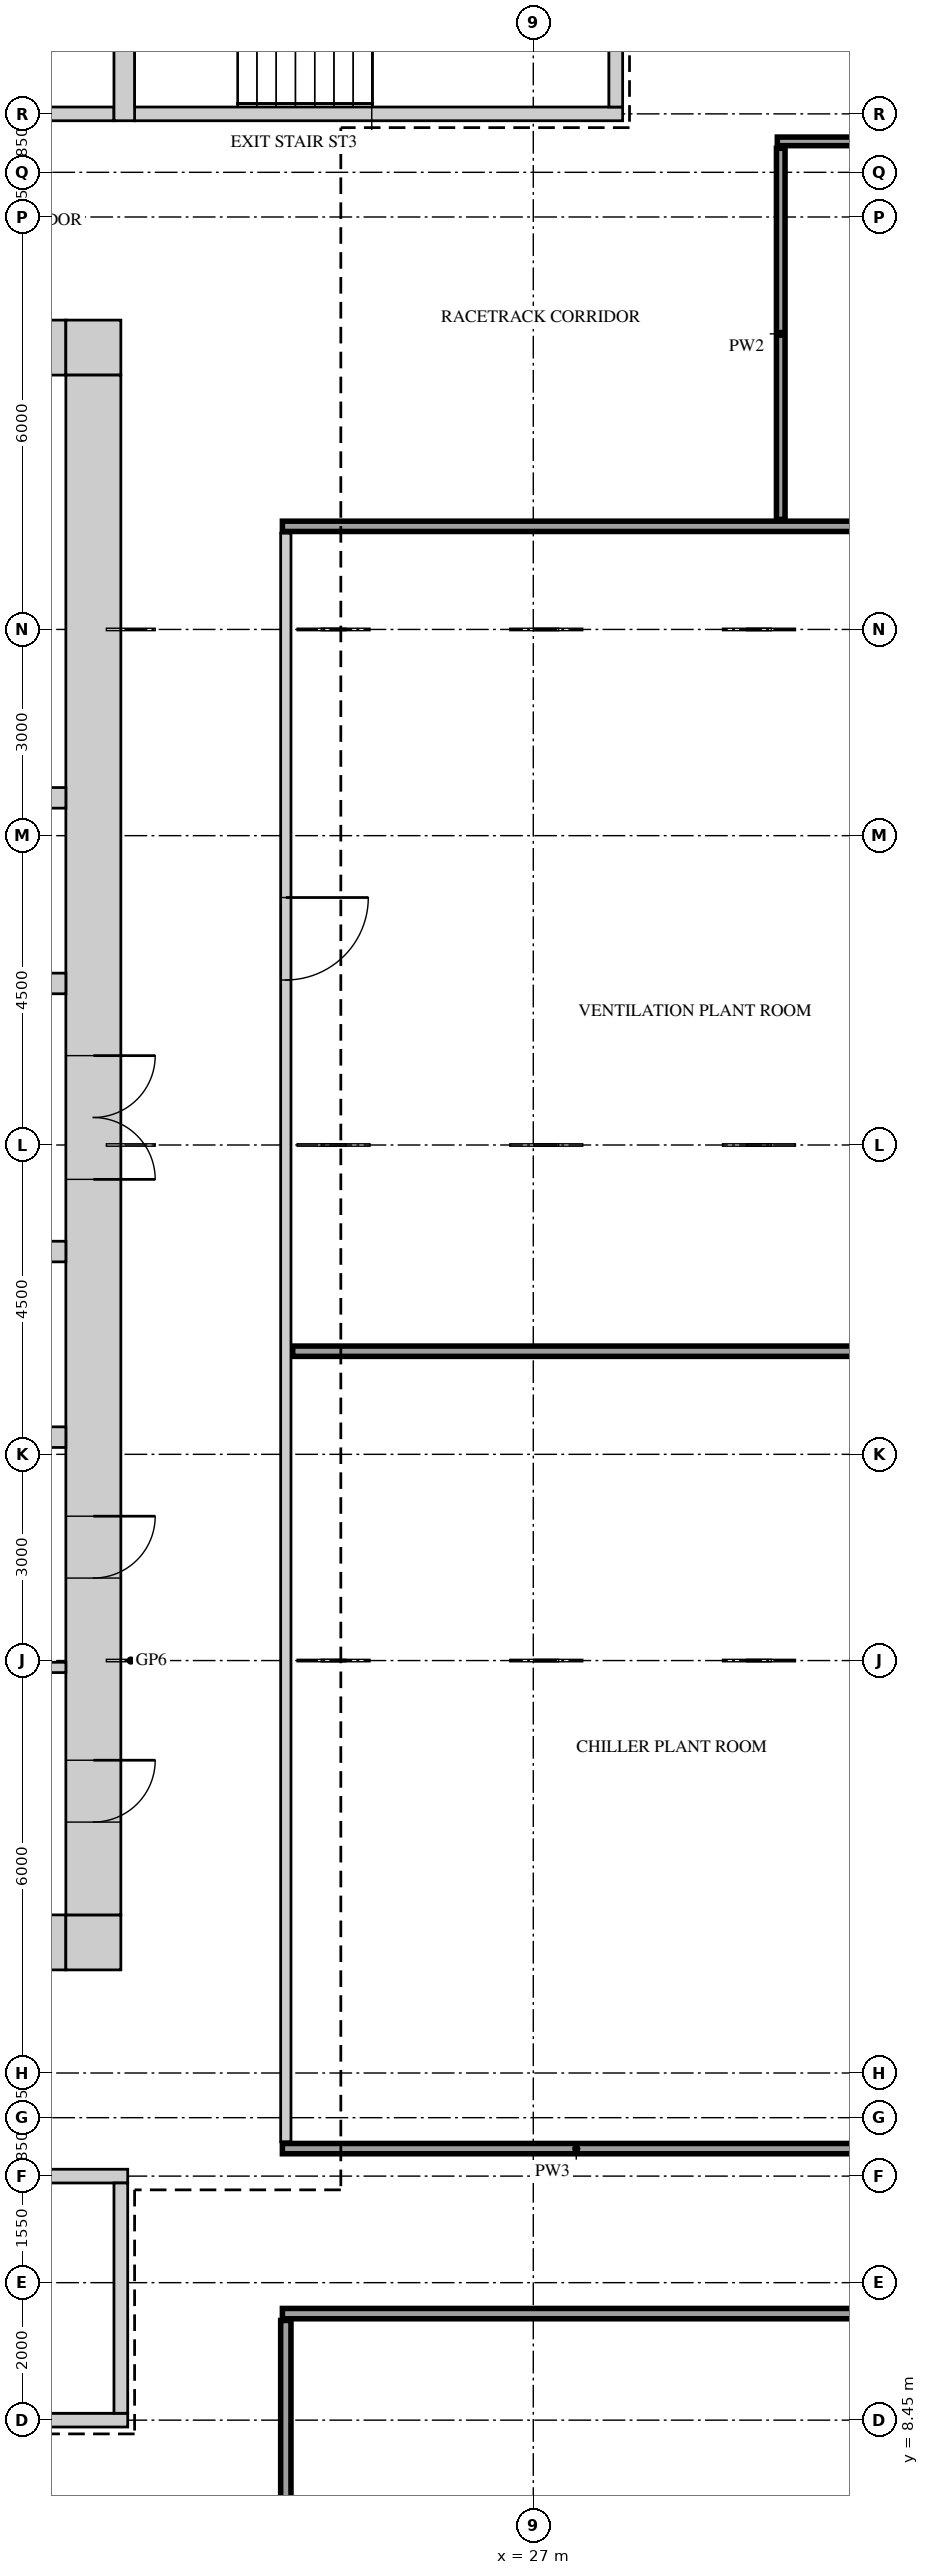
"""IFC4 building model, lengths in metres.
Left out: names, types, materials, properties, quantities, classifications, styles, units other than length and angle.
Written with IfcOpenShell. Run it as: python <this file> out.ifc"""

import sys

from ifc_helpers import new_model, si_unit, direction, frame, frame_2d, origin, place, context, subcontext, project, spatial, rectangle, extrude, source, transform, mapped, element, fill, save


model = new_model("IFC4")
c1 = context("Model", 3, precision=1e-05, world=origin(), true_north=direction((0.0, 1.0)))
c2 = subcontext(c1, "Body", "Model", "MODEL_VIEW")
j1 = project(units=[si_unit("LENGTHUNIT", "METRE"), si_unit("PLANEANGLEUNIT", "RADIAN")], contexts=[c1])
p1 = place(None, origin())
s1 = spatial("IfcSite", under=j1, at=p1, CompositionType="ELEMENT")
p2 = place(p1, origin())
s2 = spatial("IfcBuilding", under=s1, at=p2, CompositionType="ELEMENT")
p3 = place(p2, frame((0.0, 0.0, 216.7)))
s3 = spatial("IfcBuildingStorey", under=s2, at=p3, CompositionType="ELEMENT", Elevation=216.7)
m1 = source(origin(), c2, "Body", "SweptSolid", [
    extrude(rectangle(XDim=13.4, YDim=0.8, at=frame_2d((6.7, 0.0))), origin(), (0.0, 0.0, 1.0), 5.25),
])
p4 = place(p3, frame((6.8, 38.6, 0.0), z_axis=(0.0, 0.0, 1.0), x_axis=(1.0, 0.0, 0.0)))
e1 = element("IfcWall", 1, at=p4, inside=s3, PredefinedType="SHEAR", context=c2, shape_type="MappedRepresentation", body=[
    mapped(m1, transform((0.0, 0.0, 0.0))),
])
m2 = source(origin(), c2, "Body", "SweptSolid", [
    extrude(rectangle(XDim=0.9, YDim=2.1, at=frame_2d((0.45, 1.05))), frame((0.0, 0.41, 0.0), z_axis=(0.0, -1.0, 0.0), x_axis=(1.0, 0.0, 0.0)), (0.0, 0.0, 1.0), 0.82),
])
p5 = place(p4, frame((2.9, 0.0, 0.0)))
e2 = element("IfcOpeningElement", 2, at=p5, cuts=e1, PredefinedType="OPENING", context=c2, shape_type="MappedRepresentation", body=[
    mapped(m2, transform((0.0, 0.0, 0.0))),
])
p6 = place(p4, frame((9.6, 0.0, 0.0)))
e3 = element("IfcOpeningElement", 3, at=p6, cuts=e1, PredefinedType="OPENING", context=c2, shape_type="MappedRepresentation", body=[
    mapped(m2, transform((0.0, 0.0, 0.0))),
])
m3 = source(origin(), c2, "Body", "SweptSolid", [
    extrude(rectangle(XDim=0.8, YDim=0.8, at=frame_2d((0.4, 0.0))), origin(), (0.0, 0.0, 1.0), 5.25),
])
p7 = place(p3, frame((20.2, 38.6, 0.0), z_axis=(0.0, 0.0, 1.0), x_axis=(1.0, 0.0, 0.0)))
e4 = element("IfcWall", 4, at=p7, inside=s3, PredefinedType="SHEAR", context=c2, shape_type="MappedRepresentation", body=[
    mapped(m3, transform((0.0, 0.0, 0.0))),
])
p8 = place(p3, frame((6.8, 15.4, 0.0), z_axis=(0.0, 0.0, 1.0), x_axis=(1.0, 0.0, 0.0)))
e5 = element("IfcWall", 5, at=p8, inside=s3, PredefinedType="SHEAR", context=c2, shape_type="MappedRepresentation", body=[
    mapped(m1, transform((0.0, 0.0, 0.0))),
])
m4 = source(origin(), c2, "Body", "SweptSolid", [
    extrude(rectangle(XDim=1.2, YDim=2.1, at=frame_2d((0.6, 1.05))), frame((0.0, 0.41, 0.0), z_axis=(0.0, -1.0, 0.0), x_axis=(1.0, 0.0, 0.0)), (0.0, 0.0, 1.0), 0.82),
])
p9 = place(p8, frame((5.4, 0.0, 0.0)))
e6 = element("IfcOpeningElement", 6, at=p9, cuts=e5, PredefinedType="OPENING", context=c2, shape_type="MappedRepresentation", body=[
    mapped(m4, transform((0.0, 0.0, 0.0))),
])
p10 = place(p8, frame((2.05, 0.0, 0.0)))
e7 = element("IfcOpeningElement", 7, at=p10, cuts=e5, PredefinedType="OPENING", context=c2, shape_type="MappedRepresentation", body=[
    mapped(m4, transform((0.0, 0.0, 0.0))),
])
m5 = source(origin(), c2, "Body", "SweptSolid", [
    extrude(rectangle(XDim=1.0, YDim=2.1, at=frame_2d((0.5, 1.05))), frame((0.0, 0.41, 0.0), z_axis=(0.0, -1.0, 0.0), x_axis=(1.0, 0.0, 0.0)), (0.0, 0.0, 1.0), 0.82),
])
p11 = place(p8, frame((7.9, 0.0, 0.0)))
e8 = element("IfcOpeningElement", 8, at=p11, cuts=e5, PredefinedType="OPENING", context=c2, shape_type="MappedRepresentation", body=[
    mapped(m5, transform((0.0, 0.0, 0.0))),
])
p12 = place(p3, frame((20.2, 15.4, 0.0), z_axis=(0.0, 0.0, 1.0), x_axis=(1.0, 0.0, 0.0)))
e9 = element("IfcWall", 9, at=p12, inside=s3, PredefinedType="SHEAR", context=c2, shape_type="MappedRepresentation", body=[
    mapped(m3, transform((0.0, 0.0, 0.0))),
])
m6 = source(origin(), c2, "Body", "SweptSolid", [
    extrude(rectangle(XDim=22.4, YDim=0.8, at=frame_2d((11.2, 0.0))), origin(), (0.0, 0.0, 1.0), 5.25),
])
p13 = place(p3, frame((20.6, 15.8, 0.0), z_axis=(0.0, 0.0, 1.0), x_axis=(0.0, 1.0, 0.0)))
e10 = element("IfcWall", 10, at=p13, inside=s3, PredefinedType="SHEAR", context=c2, shape_type="MappedRepresentation", body=[
    mapped(m6, transform((0.0, 0.0, 0.0))),
])
m7 = source(origin(), c2, "Body", "SweptSolid", [
    extrude(rectangle(XDim=1.8, YDim=2.1, at=frame_2d((0.9, 1.05))), frame((0.0, 0.41, 0.0), z_axis=(0.0, -1.0, 0.0), x_axis=(1.0, 0.0, 0.0)), (0.0, 0.0, 1.0), 0.82),
])
p14 = place(p13, frame((10.7, 0.0, 0.0)))
e11 = element("IfcOpeningElement", 11, at=p14, cuts=e10, PredefinedType="OPENING", context=c2, shape_type="MappedRepresentation", body=[
    mapped(m7, transform((0.0, 0.0, 0.0))),
])
p15 = place(p13, frame((1.35, 0.0, 0.0)))
e12 = element("IfcOpeningElement", 12, at=p15, cuts=e10, PredefinedType="OPENING", context=c2, shape_type="MappedRepresentation", body=[
    mapped(m2, transform((0.0, 0.0, 0.0))),
])
p16 = place(p13, frame((4.9, 0.0, 0.0)))
e13 = element("IfcOpeningElement", 13, at=p16, cuts=e10, PredefinedType="OPENING", context=c2, shape_type="MappedRepresentation", body=[
    mapped(m2, transform((0.0, 0.0, 0.0))),
])
m8 = source(origin(), c2, "Body", "SweptSolid", [
    extrude(rectangle(XDim=7.0, YDim=0.2, at=frame_2d((3.5, 0.0))), origin(), (0.0, 0.0, 1.0), 5.25),
])
p17 = place(p3, frame((13.9, 42.0, 0.0), z_axis=(0.0, 0.0, 1.0), x_axis=(1.0, 0.0, 0.0)))
e14 = element("IfcWall", 14, at=p17, inside=s3, PredefinedType="SHEAR", context=c2, shape_type="MappedRepresentation", body=[
    mapped(m8, transform((0.0, 0.0, 0.0))),
])
m9 = source(origin(), c2, "Body", "SweptSolid", [
    extrude(rectangle(XDim=7.2, YDim=0.2, at=frame_2d((3.6, 0.0))), origin(), (0.0, 0.0, 1.0), 5.25),
])
p18 = place(p3, frame((13.9, 12.0, 0.0), z_axis=(0.0, 0.0, 1.0), x_axis=(1.0, 0.0, 0.0)))
e15 = element("IfcWall", 15, at=p18, inside=s3, PredefinedType="SHEAR", context=c2, shape_type="MappedRepresentation", body=[
    mapped(m9, transform((0.0, 0.0, 0.0))),
])
p19 = place(p3, frame((13.9, 8.45, 0.0), z_axis=(0.0, 0.0, 1.0), x_axis=(1.0, 0.0, 0.0)))
e16 = element("IfcWall", 16, at=p19, inside=s3, PredefinedType="SHEAR", context=c2, shape_type="MappedRepresentation", body=[
    mapped(m9, transform((0.0, 0.0, 0.0))),
])
m10 = source(origin(), c2, "Body", "SweptSolid", [
    extrude(rectangle(XDim=1.2, YDim=2.1, at=frame_2d((0.6, 1.05))), frame((0.0, 0.11, 0.0), z_axis=(0.0, -1.0, 0.0), x_axis=(1.0, 0.0, 0.0)), (0.0, 0.0, 1.0), 0.22),
])
p20 = place(p19, frame((0.35, 0.0, 0.0)))
e17 = element("IfcOpeningElement", 17, at=p20, cuts=e16, PredefinedType="OPENING", context=c2, shape_type="MappedRepresentation", body=[
    mapped(m10, transform((0.0, 0.0, 0.0))),
])
m11 = source(origin(), c2, "Body", "SweptSolid", [
    extrude(rectangle(XDim=7.1, YDim=0.2, at=frame_2d((3.55, 0.0))), origin(), (0.0, 0.0, 1.0), 5.25),
])
p21 = place(p3, frame((21.2, 42.0, 0.0), z_axis=(0.0, 0.0, 1.0), x_axis=(1.0, 0.0, 0.0)))
e18 = element("IfcWall", 18, at=p21, inside=s3, PredefinedType="SHEAR", context=c2, shape_type="MappedRepresentation", body=[
    mapped(m11, transform((0.0, 0.0, 0.0))),
])
m12 = source(origin(), c2, "Body", "SweptSolid", [
    extrude(rectangle(XDim=3.75, YDim=0.3, at=frame_2d((1.875, 0.0))), origin(), (0.0, 0.0, 1.0), 5.25),
])
p22 = place(p3, frame((21.05, 41.9, 0.0), z_axis=(0.0, 0.0, 1.0), x_axis=(0.0, 1.0, 0.0)))
e19 = element("IfcWall", 19, at=p22, inside=s3, PredefinedType="SHEAR", context=c2, shape_type="MappedRepresentation", body=[
    mapped(m12, transform((0.0, 0.0, 0.0))),
])
m13 = source(origin(), c2, "Body", "SweptSolid", [
    extrude(rectangle(XDim=3.35, YDim=0.2, at=frame_2d((1.675, 0.0))), origin(), (0.0, 0.0, 1.0), 5.25),
])
for number, where, z_axis, x_axis in (
    (20, (21.0, 8.55, 0.0), (0.0, 0.0, 1.0), (0.0, 1.0, 0.0)),
    (21, (28.2, 42.1, 0.0), (0.0, 0.0, 1.0), (0.0, 1.0, 0.0)),
):
    element("IfcWall", number, at=place(p3, frame(where, z_axis=z_axis, x_axis=x_axis)), inside=s3, PredefinedType="SHEAR", context=c2, shape_type="MappedRepresentation", body=[
        mapped(m13, transform((0.0, 0.0, 0.0))),
    ])
m14 = source(origin(), c2, "Body", "SweptSolid", [
    extrude(rectangle(XDim=13.4, YDim=0.3, at=frame_2d((6.7, 0.0))), origin(), (0.0, 0.0, 1.0), 5.25),
])
for number, where, z_axis, x_axis in (
    (22, (6.8, 22.75, 0.0), (0.0, 0.0, 1.0), (1.0, 0.0, 0.0)),
    (23, (6.8, 32.05, 0.0), (0.0, 0.0, 1.0), (1.0, 0.0, 0.0)),
):
    element("IfcWall", number, at=place(p3, frame(where, z_axis=z_axis, x_axis=x_axis)), inside=s3, PredefinedType="STANDARD", context=c2, shape_type="MappedRepresentation", body=[
        mapped(m14, transform((0.0, 0.0, 0.0))),
    ])
p23 = place(p3, frame((6.8, 29.35, 0.0), z_axis=(0.0, 0.0, 1.0), x_axis=(1.0, 0.0, 0.0)))
e24 = element("IfcWall", 24, at=p23, inside=s3, PredefinedType="STANDARD", context=c2, shape_type="MappedRepresentation", body=[
    mapped(m14, transform((0.0, 0.0, 0.0))),
])
m15 = source(origin(), c2, "Body", "SweptSolid", [
    extrude(rectangle(XDim=1.2, YDim=2.1, at=frame_2d((0.6, 1.05))), frame((0.0, 0.16, 0.0), z_axis=(0.0, -1.0, 0.0), x_axis=(1.0, 0.0, 0.0)), (0.0, 0.0, 1.0), 0.32),
])
p24 = place(p23, frame((0.95, 0.0, 0.0)))
e25 = element("IfcOpeningElement", 25, at=p24, cuts=e24, PredefinedType="OPENING", context=c2, shape_type="MappedRepresentation", body=[
    mapped(m15, transform((0.0, 0.0, 0.0))),
])
p25 = place(p23, frame((3.5, 0.0, 0.0)))
e26 = element("IfcOpeningElement", 26, at=p25, cuts=e24, PredefinedType="OPENING", context=c2, shape_type="MappedRepresentation", body=[
    mapped(m15, transform((0.0, 0.0, 0.0))),
])
p26 = place(p23, frame((6.05, 0.0, 0.0)))
e27 = element("IfcOpeningElement", 27, at=p26, cuts=e24, PredefinedType="OPENING", context=c2, shape_type="MappedRepresentation", body=[
    mapped(m15, transform((0.0, 0.0, 0.0))),
])
p27 = place(p23, frame((8.6, 0.0, 0.0)))
e28 = element("IfcOpeningElement", 28, at=p27, cuts=e24, PredefinedType="OPENING", context=c2, shape_type="MappedRepresentation", body=[
    mapped(m15, transform((0.0, 0.0, 0.0))),
])
p28 = place(p23, frame((11.15, 0.0, 0.0)))
e29 = element("IfcOpeningElement", 29, at=p28, cuts=e24, PredefinedType="OPENING", context=c2, shape_type="MappedRepresentation", body=[
    mapped(m15, transform((0.0, 0.0, 0.0))),
])
p29 = place(p3, frame((6.8, 25.45, 0.0), z_axis=(0.0, 0.0, 1.0), x_axis=(1.0, 0.0, 0.0)))
e30 = element("IfcWall", 30, at=p29, inside=s3, PredefinedType="STANDARD", context=c2, shape_type="MappedRepresentation", body=[
    mapped(m14, transform((0.0, 0.0, 0.0))),
])
p30 = place(p29, frame((0.95, 0.0, 0.0)))
e31 = element("IfcOpeningElement", 31, at=p30, cuts=e30, PredefinedType="OPENING", context=c2, shape_type="MappedRepresentation", body=[
    mapped(m15, transform((0.0, 0.0, 0.0))),
])
p31 = place(p29, frame((3.5, 0.0, 0.0)))
e32 = element("IfcOpeningElement", 32, at=p31, cuts=e30, PredefinedType="OPENING", context=c2, shape_type="MappedRepresentation", body=[
    mapped(m15, transform((0.0, 0.0, 0.0))),
])
p32 = place(p29, frame((6.05, 0.0, 0.0)))
e33 = element("IfcOpeningElement", 33, at=p32, cuts=e30, PredefinedType="OPENING", context=c2, shape_type="MappedRepresentation", body=[
    mapped(m15, transform((0.0, 0.0, 0.0))),
])
p33 = place(p29, frame((8.6, 0.0, 0.0)))
e34 = element("IfcOpeningElement", 34, at=p33, cuts=e30, PredefinedType="OPENING", context=c2, shape_type="MappedRepresentation", body=[
    mapped(m15, transform((0.0, 0.0, 0.0))),
])
p34 = place(p29, frame((11.15, 0.0, 0.0)))
e35 = element("IfcOpeningElement", 35, at=p34, cuts=e30, PredefinedType="OPENING", context=c2, shape_type="MappedRepresentation", body=[
    mapped(m15, transform((0.0, 0.0, 0.0))),
])
m16 = source(origin(), c2, "Body", "SweptSolid", [
    extrude(rectangle(XDim=6.75, YDim=0.15, at=frame_2d((3.375, 0.0))), origin(), (0.0, 0.0, 1.0), 5.25),
])
p35 = place(p3, frame((23.4, 3.15, 0.0), z_axis=(0.0, 0.0, 1.0), x_axis=(0.0, 1.0, 0.0)))
e36 = element("IfcWall", 36, at=p35, inside=s3, PredefinedType="PARTITIONING", context=c2, shape_type="MappedRepresentation", body=[
    mapped(m16, transform((0.0, 0.0, 0.0))),
])
m17 = source(origin(), c2, "Body", "SweptSolid", [
    extrude(rectangle(XDim=27.5, YDim=0.15, at=frame_2d((13.75, 0.0))), origin(), (0.0, 0.0, 1.0), 5.25),
])
p36 = place(p3, frame((23.35, 10.0, 0.0), z_axis=(0.0, 0.0, 1.0), x_axis=(1.0, 0.0, 0.0)))
e37 = element("IfcWall", 37, at=p36, inside=s3, PredefinedType="PARTITIONING", context=c2, shape_type="MappedRepresentation", body=[
    mapped(m17, transform((0.0, 0.0, 0.0))),
])
m18 = source(origin(), c2, "Body", "SweptSolid", [
    extrude(rectangle(XDim=1.2, YDim=2.1, at=frame_2d((0.6, 1.05))), frame((0.0, 0.085, 0.0), z_axis=(0.0, -1.0, 0.0), x_axis=(1.0, 0.0, 0.0)), (0.0, 0.0, 1.0), 0.17),
])
p37 = place(p36, frame((9.75, 0.0, 0.0)))
e38 = element("IfcOpeningElement", 38, at=p37, cuts=e37, PredefinedType="OPENING", context=c2, shape_type="MappedRepresentation", body=[
    mapped(m18, transform((0.0, 0.0, 0.0))),
])
m19 = source(origin(), c2, "Body", "SweptSolid", [
    extrude(rectangle(XDim=18.3, YDim=0.15, at=frame_2d((9.15, 0.0))), origin(), (0.0, 0.0, 1.0), 5.25),
])
p38 = place(p3, frame((23.35, 12.4, 0.0), z_axis=(0.0, 0.0, 1.0), x_axis=(1.0, 0.0, 0.0)))
e39 = element("IfcWall", 39, at=p38, inside=s3, PredefinedType="PARTITIONING", context=c2, shape_type="MappedRepresentation", body=[
    mapped(m19, transform((0.0, 0.0, 0.0))),
])
p39 = place(p38, frame((8.55, 0.0, 0.0)))
e40 = element("IfcOpeningElement", 40, at=p39, cuts=e39, PredefinedType="OPENING", context=c2, shape_type="MappedRepresentation", body=[
    mapped(m18, transform((0.0, 0.0, 0.0))),
])
m20 = source(origin(), c2, "Body", "SweptSolid", [
    extrude(rectangle(XDim=23.4, YDim=0.15, at=frame_2d((11.7, 0.0))), origin(), (0.0, 0.0, 1.0), 5.25),
])
p40 = place(p3, frame((23.4, 12.5, 0.0), z_axis=(0.0, 0.0, 1.0), x_axis=(0.0, 1.0, 0.0)))
e41 = element("IfcWall", 41, at=p40, inside=s3, PredefinedType="PARTITIONING", context=c2, shape_type="MappedRepresentation", body=[
    mapped(m20, transform((0.0, 0.0, 0.0))),
])
p41 = place(p40, frame((16.9, 0.0, 0.0)))
e42 = element("IfcOpeningElement", 42, at=p41, cuts=e41, PredefinedType="OPENING", context=c2, shape_type="MappedRepresentation", body=[
    mapped(m18, transform((0.0, 0.0, 0.0))),
])
m21 = source(origin(), c2, "Body", "SweptSolid", [
    extrude(rectangle(XDim=4.1, YDim=0.15, at=frame_2d((2.05, 0.0))), origin(), (0.0, 0.0, 1.0), 5.25),
])
p42 = place(p3, frame((16.1, 19.4, 0.0), z_axis=(0.0, 0.0, 1.0), x_axis=(1.0, 0.0, 0.0)))
e43 = element("IfcWall", 43, at=p42, inside=s3, PredefinedType="PARTITIONING", context=c2, shape_type="MappedRepresentation", body=[
    mapped(m21, transform((0.0, 0.0, 0.0))),
])
m22 = source(origin(), c2, "Body", "SweptSolid", [
    extrude(rectangle(XDim=18.0, YDim=0.15, at=frame_2d((9.0, 0.0))), origin(), (0.0, 0.0, 1.0), 5.25),
])
p43 = place(p3, frame((23.5, 24.0, 0.0), z_axis=(0.0, 0.0, 1.0), x_axis=(1.0, 0.0, 0.0)))
e44 = element("IfcWall", 44, at=p43, inside=s3, PredefinedType="PARTITIONING", context=c2, shape_type="MappedRepresentation", body=[
    mapped(m22, transform((0.0, 0.0, 0.0))),
])
p44 = place(p3, frame((23.35, 36.0, 0.0), z_axis=(0.0, 0.0, 1.0), x_axis=(1.0, 0.0, 0.0)))
e45 = element("IfcWall", 45, at=p44, inside=s3, PredefinedType="PARTITIONING", context=c2, shape_type="MappedRepresentation", body=[
    mapped(m19, transform((0.0, 0.0, 0.0))),
])
m23 = source(origin(), c2, "Body", "SweptSolid", [
    extrude(rectangle(XDim=5.4, YDim=0.125, at=frame_2d((2.7, 0.0))), origin(), (0.0, 0.0, 1.0), 5.25),
])
p45 = place(p3, frame((30.6, 36.1, 0.0), z_axis=(0.0, 0.0, 1.0), x_axis=(0.0, 1.0, 0.0)))
e46 = element("IfcWall", 46, at=p45, inside=s3, PredefinedType="PARTITIONING", context=c2, shape_type="MappedRepresentation", body=[
    mapped(m23, transform((0.0, 0.0, 0.0))),
])
m24 = source(origin(), c2, "Body", "SweptSolid", [
    extrude(rectangle(XDim=11.1, YDim=0.125, at=frame_2d((5.55, 0.0))), origin(), (0.0, 0.0, 1.0), 5.25),
])
p46 = place(p3, frame((30.55, 41.6, 0.0), z_axis=(0.0, 0.0, 1.0), x_axis=(1.0, 0.0, 0.0)))
e47 = element("IfcWall", 47, at=p46, inside=s3, PredefinedType="PARTITIONING", context=c2, shape_type="MappedRepresentation", body=[
    mapped(m24, transform((0.0, 0.0, 0.0))),
])
m25 = source(origin(), c2, "Body", "SweptSolid", [
    extrude(rectangle(XDim=0.9, YDim=2.1, at=frame_2d((0.45, 1.05))), frame((0.0, 0.073, 0.0), z_axis=(0.0, -1.0, 0.0), x_axis=(1.0, 0.0, 0.0)), (0.0, 0.0, 1.0), 0.145),
])
p47 = place(p46, frame((5.25, 0.0, 0.0)))
e48 = element("IfcOpeningElement", 48, at=p47, cuts=e47, PredefinedType="OPENING", context=c2, shape_type="MappedRepresentation", body=[
    mapped(m25, transform((0.0, 0.0, 0.0))),
])
m26 = source(origin(), c2, "Body", "SweptSolid", [
    extrude(rectangle(XDim=1.8, YDim=2.1, at=frame_2d((0.9, 1.05))), frame((0.0, 0.35, 0.0), z_axis=(0.0, -1.0, 0.0), x_axis=(1.0, 0.0, 0.0)), (0.0, 0.0, 1.0), 0.7),
])
p48 = place(p14, origin())
e49 = element("IfcDoor", 49, at=p48, inside=s3, OperationType="DOUBLE_DOOR_SINGLE_SWING", PredefinedType="DOOR", context=c2, shape_type="MappedRepresentation", body=[
    mapped(m26, transform((0.0, 0.0, 0.0))),
])
fill(e11, e49)
m27 = source(origin(), c2, "Body", "SweptSolid", [
    extrude(rectangle(XDim=0.9, YDim=2.1, at=frame_2d((0.45, 1.05))), frame((0.0, 0.35, 0.0), z_axis=(0.0, -1.0, 0.0), x_axis=(1.0, 0.0, 0.0)), (0.0, 0.0, 1.0), 0.7),
])
p49 = place(p15, origin())
e50 = element("IfcDoor", 50, at=p49, inside=s3, OperationType="SINGLE_SWING_RIGHT", PredefinedType="DOOR", context=c2, shape_type="MappedRepresentation", body=[
    mapped(m27, transform((0.0, 0.0, 0.0))),
])
fill(e12, e50)
p50 = place(p16, origin())
e51 = element("IfcDoor", 51, at=p50, inside=s3, OperationType="SINGLE_SWING_RIGHT", PredefinedType="DOOR", context=c2, shape_type="MappedRepresentation", body=[
    mapped(m27, transform((0.0, 0.0, 0.0))),
])
fill(e13, e51)
m28 = source(origin(), c2, "Body", "SweptSolid", [
    extrude(rectangle(XDim=1.2, YDim=2.1, at=frame_2d((0.6, 1.05))), frame((0.0, 0.025, 0.0), z_axis=(0.0, -1.0, 0.0), x_axis=(1.0, 0.0, 0.0)), (0.0, 0.0, 1.0), 0.05),
])
p51 = place(p41, origin())
e52 = element("IfcDoor", 52, at=p51, inside=s3, OperationType="SINGLE_SWING_RIGHT", PredefinedType="DOOR", context=c2, shape_type="MappedRepresentation", body=[
    mapped(m28, transform((0.0, 0.0, 0.0))),
])
fill(e42, e52)
save(model, sys.argv[1])
